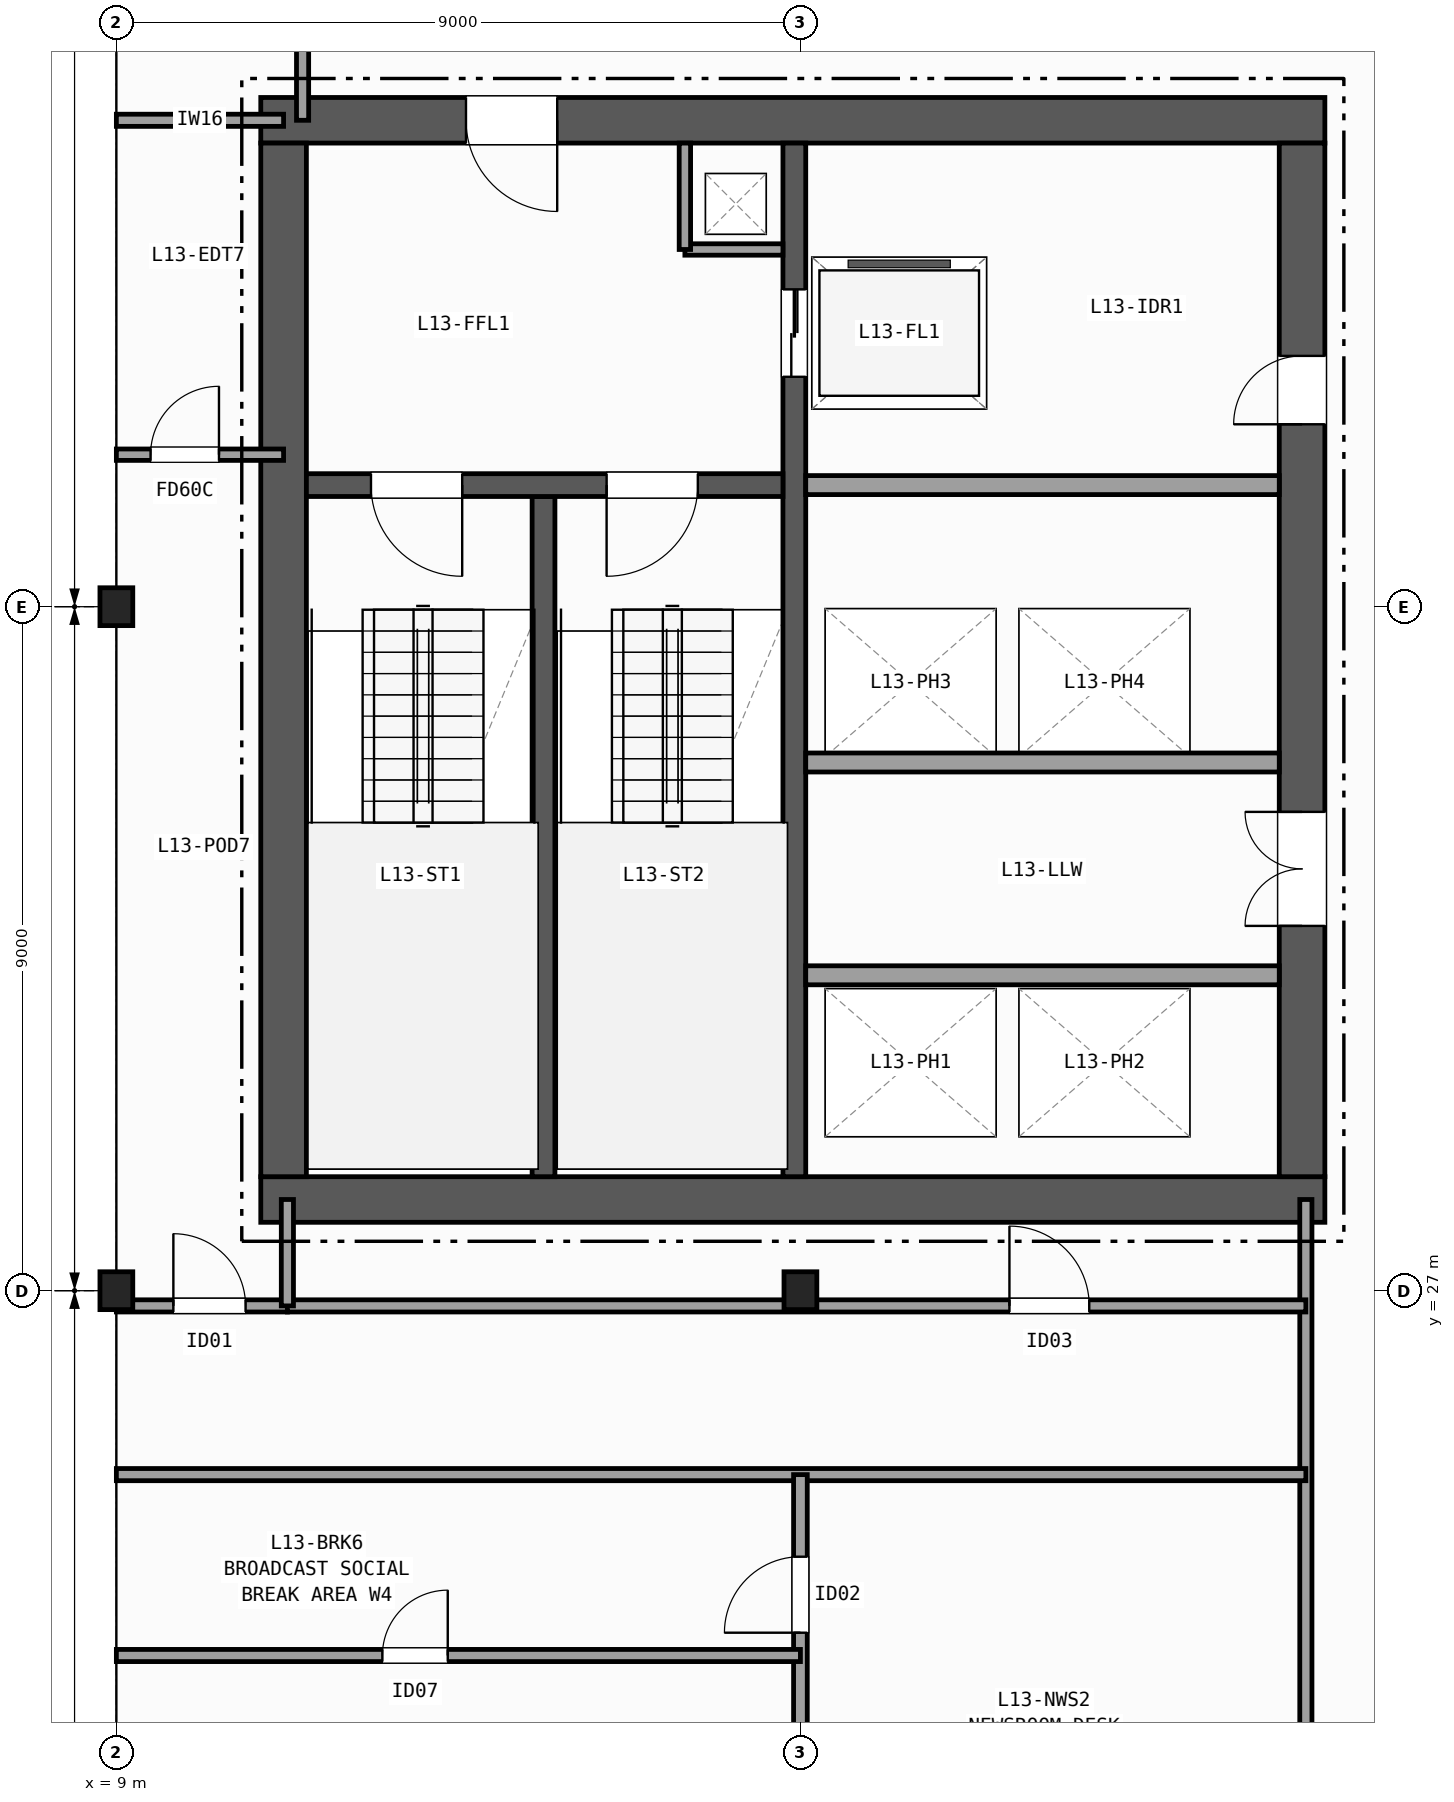
"""IFC4 building model, lengths in metres.
Left out: names, types, materials, properties, quantities, classifications, styles, units other than length and angle.
Written with IfcOpenShell. Run it as: python <this file> out.ifc"""

import sys

from ifc_helpers import new_model, si_unit, direction, frame, frame_2d, origin, origin_2d, place, context, subcontext, project, spatial, rectangle, i_section, extrude, element, fill, save


model = new_model("IFC4")
c1 = context("Model", 3, precision=1e-05, world=origin(), true_north=direction((0.0, 1.0)))
c2 = subcontext(c1, "Body", "Model", "MODEL_VIEW")
j1 = project(units=[si_unit("LENGTHUNIT", "METRE"), si_unit("PLANEANGLEUNIT", "RADIAN")], contexts=[c1])
p1 = place(None, origin())
s1 = spatial("IfcSite", under=j1, at=p1, CompositionType="ELEMENT")
p2 = place(p1, origin())
s2 = spatial("IfcBuilding", under=s1, at=p2, CompositionType="ELEMENT")
p3 = place(p2, frame((0.0, 0.0, 58.2)))
s3 = spatial("IfcBuildingStorey", under=s2, at=p3, CompositionType="ELEMENT", Elevation=58.2)
for number, where, z_axis, x_axis in (
    (1, (9.0, 27.0, 0.0), (0.0, 0.0, 1.0), (1.0, 0.0, 0.0)),
    (2, (9.0, 36.0, 0.0), (0.0, 0.0, 1.0), (1.0, 0.0, 0.0)),
    (3, (18.0, 27.0, 0.0), (0.0, 0.0, 1.0), (1.0, 0.0, 0.0)),
):
    element("IfcColumn", number, at=place(p3, frame(where, z_axis=z_axis, x_axis=x_axis)), inside=s3, PredefinedType="COLUMN", context=c2, shape_type="SweptSolid", body=[
        extrude(i_section(OverallWidth=0.432, OverallDepth=0.498, WebThickness=0.056, FlangeThickness=0.089, FilletRadius=0.015, at=origin_2d()), origin(), (0.0, 0.0, 1.0), 3.7),
    ])
p4 = place(p3, frame((10.9, 28.2, 0.0), z_axis=(0.0, 0.0, 1.0), x_axis=(1.0, 0.0, 0.0)))
e4 = element("IfcWall", 4, at=p4, inside=s3, PredefinedType="SHEAR", context=c2, shape_type="SweptSolid", body=[
    extrude(rectangle(XDim=14.0, YDim=0.6, at=frame_2d((7.0, 0.0))), origin(), (0.0, 0.0, 1.0), 3.42),
])
p5 = place(p3, frame((24.9, 42.4, 0.0), z_axis=(0.0, 0.0, 1.0), x_axis=(-1.0, 0.0, 0.0)))
e5 = element("IfcWall", 5, at=p5, inside=s3, PredefinedType="SHEAR", context=c2, shape_type="SweptSolid", body=[
    extrude(rectangle(XDim=14.0, YDim=0.6, at=frame_2d((7.0, 0.0))), origin(), (0.0, 0.0, 1.0), 3.42),
])
p6 = place(p5, frame((10.1, 0.0, 0.0)))
e6 = element("IfcOpeningElement", 6, at=p6, cuts=e5, PredefinedType="OPENING", context=c2, shape_type="SweptSolid", body=[
    extrude(rectangle(XDim=1.2, YDim=2.15, at=frame_2d((0.6, 1.075))), frame((0.0, 0.31, 0.0), z_axis=(0.0, -1.0, 0.0), x_axis=(1.0, 0.0, 0.0)), (0.0, 0.0, 1.0), 0.62),
])
p7 = place(p3, frame((11.2, 42.1, 0.0), z_axis=(0.0, 0.0, 1.0), x_axis=(0.0, -1.0, 0.0)))
e7 = element("IfcWall", 7, at=p7, inside=s3, PredefinedType="SHEAR", context=c2, shape_type="SweptSolid", body=[
    extrude(rectangle(XDim=13.6, YDim=0.6, at=frame_2d((6.8, 0.0))), origin(), (0.0, 0.0, 1.0), 3.42),
])
p8 = place(p3, frame((24.6, 28.5, 0.0), z_axis=(0.0, 0.0, 1.0), x_axis=(0.0, 1.0, 0.0)))
e8 = element("IfcWall", 8, at=p8, inside=s3, PredefinedType="SHEAR", context=c2, shape_type="SweptSolid", body=[
    extrude(rectangle(XDim=13.6, YDim=0.6, at=frame_2d((6.8, 0.0))), origin(), (0.0, 0.0, 1.0), 3.42),
])
p9 = place(p8, frame((3.3, 0.0, 0.0)))
e9 = element("IfcOpeningElement", 9, at=p9, cuts=e8, PredefinedType="OPENING", context=c2, shape_type="SweptSolid", body=[
    extrude(rectangle(XDim=1.5, YDim=2.2, at=frame_2d((0.75, 1.1))), frame((0.0, 0.31, 0.0), z_axis=(0.0, -1.0, 0.0), x_axis=(1.0, 0.0, 0.0)), (0.0, 0.0, 1.0), 0.62),
])
p10 = place(p8, frame((9.9, 0.0, 0.0)))
e10 = element("IfcOpeningElement", 10, at=p10, cuts=e8, PredefinedType="OPENING", context=c2, shape_type="SweptSolid", body=[
    extrude(rectangle(XDim=0.9, YDim=2.1, at=frame_2d((0.45, 1.05))), frame((0.0, 0.31, 0.0), z_axis=(0.0, -1.0, 0.0), x_axis=(1.0, 0.0, 0.0)), (0.0, 0.0, 1.0), 0.62),
])
p11 = place(p3, frame((14.62, 28.5, 0.0), z_axis=(0.0, 0.0, 1.0), x_axis=(0.0, 1.0, 0.0)))
e11 = element("IfcWall", 11, at=p11, inside=s3, PredefinedType="SHEAR", context=c2, shape_type="SweptSolid", body=[
    extrude(rectangle(XDim=8.95, YDim=0.3, at=frame_2d((4.475, 0.0))), origin(), (0.0, 0.0, 1.0), 3.42),
])
p12 = place(p3, frame((17.92, 42.1, 0.0), z_axis=(0.0, 0.0, 1.0), x_axis=(0.0, -1.0, 0.0)))
e12 = element("IfcWall", 12, at=p12, inside=s3, PredefinedType="SHEAR", context=c2, shape_type="SweptSolid", body=[
    extrude(rectangle(XDim=13.6, YDim=0.3, at=frame_2d((6.8, 0.0))), origin(), (0.0, 0.0, 1.0), 3.42),
])
p13 = place(p12, frame((1.925, 0.0, 0.0)))
e13 = element("IfcOpeningElement", 13, at=p13, cuts=e12, PredefinedType="OPENING", context=c2, shape_type="SweptSolid", body=[
    extrude(rectangle(XDim=1.15, YDim=2.15, at=frame_2d((0.575, 1.075))), frame((0.0, 0.16, 0.0), z_axis=(0.0, -1.0, 0.0), x_axis=(1.0, 0.0, 0.0)), (0.0, 0.0, 1.0), 0.32),
])
p14 = place(p3, frame((17.77, 37.6, 0.0), z_axis=(0.0, 0.0, 1.0), x_axis=(-1.0, 0.0, 0.0)))
e14 = element("IfcWall", 14, at=p14, inside=s3, PredefinedType="SHEAR", context=c2, shape_type="SweptSolid", body=[
    extrude(rectangle(XDim=6.27, YDim=0.3, at=frame_2d((3.135, 0.0))), origin(), (0.0, 0.0, 1.0), 3.42),
])
p15 = place(p14, frame((4.22, 0.0, 0.0)))
e15 = element("IfcOpeningElement", 15, at=p15, cuts=e14, PredefinedType="OPENING", context=c2, shape_type="SweptSolid", body=[
    extrude(rectangle(XDim=1.2, YDim=2.15, at=frame_2d((0.6, 1.075))), frame((0.0, 0.16, 0.0), z_axis=(0.0, -1.0, 0.0), x_axis=(1.0, 0.0, 0.0)), (0.0, 0.0, 1.0), 0.32),
])
p16 = place(p14, frame((1.12, 0.0, 0.0)))
e16 = element("IfcOpeningElement", 16, at=p16, cuts=e14, PredefinedType="OPENING", context=c2, shape_type="SweptSolid", body=[
    extrude(rectangle(XDim=1.2, YDim=2.15, at=frame_2d((0.6, 1.075))), frame((0.0, 0.16, 0.0), z_axis=(0.0, -1.0, 0.0), x_axis=(1.0, 0.0, 0.0)), (0.0, 0.0, 1.0), 0.32),
])
p17 = place(p3, frame((16.48, 40.7, 0.0), z_axis=(0.0, 0.0, 1.0), x_axis=(1.0, 0.0, 0.0)))
e17 = element("IfcWall", 17, at=p17, inside=s3, PredefinedType="PARTITIONING", context=c2, shape_type="SweptSolid", body=[
    extrude(rectangle(XDim=1.29, YDim=0.15, at=frame_2d((0.645, 0.0))), origin(), (0.0, 0.0, 1.0), 3.42),
])
p18 = place(p3, frame((16.48, 40.7, 0.0), z_axis=(0.0, 0.0, 1.0), x_axis=(0.0, 1.0, 0.0)))
e18 = element("IfcWall", 18, at=p18, inside=s3, PredefinedType="PARTITIONING", context=c2, shape_type="SweptSolid", body=[
    extrude(rectangle(XDim=1.4, YDim=0.15, at=frame_2d((0.7, 0.0))), origin(), (0.0, 0.0, 1.0), 3.42),
])
for number, where, z_axis, x_axis in (
    (19, (18.07, 37.6, 0.0), (0.0, 0.0, 1.0), (1.0, 0.0, 0.0)),
    (20, (18.07, 31.15, 0.0), (0.0, 0.0, 1.0), (1.0, 0.0, 0.0)),
    (21, (24.3, 33.95, 0.0), (0.0, 0.0, 1.0), (-1.0, 0.0, 0.0)),
):
    element("IfcWall", number, at=place(p3, frame(where, z_axis=z_axis, x_axis=x_axis)), inside=s3, PredefinedType="PARTITIONING", context=c2, shape_type="SweptSolid", body=[
        extrude(rectangle(XDim=6.23, YDim=0.25, at=frame_2d((3.115, 0.0))), origin(), (0.0, 0.0, 1.0), 3.42),
    ])
p19 = place(p3, frame((9.0, 26.8, 0.0), z_axis=(0.0, 0.0, 1.0), x_axis=(1.0, 0.0, 0.0)))
e22 = element("IfcWall", 22, at=p19, inside=s3, PredefinedType="PARTITIONING", context=c2, shape_type="SweptSolid", body=[
    extrude(rectangle(XDim=2.25, YDim=0.16, at=frame_2d((1.125, 0.0))), origin(), (0.0, 0.0, 1.0), 2.627),
])
p20 = place(p19, frame((0.75, 0.0, 0.0)))
e23 = element("IfcOpeningElement", 23, at=p20, cuts=e22, PredefinedType="OPENING", context=c2, shape_type="SweptSolid", body=[
    extrude(rectangle(XDim=0.95, YDim=2.1, at=frame_2d((0.475, 1.05))), frame((0.0, 0.09, 0.0), z_axis=(0.0, -1.0, 0.0), x_axis=(1.0, 0.0, 0.0)), (0.0, 0.0, 1.0), 0.18),
])
p21 = place(p3, frame((9.0, 42.4, 0.0), z_axis=(0.0, 0.0, 1.0), x_axis=(1.0, 0.0, 0.0)))
e24 = element("IfcWall", 24, at=p21, inside=s3, PredefinedType="PARTITIONING", context=c2, shape_type="SweptSolid", body=[
    extrude(rectangle(XDim=2.2, YDim=0.16, at=frame_2d((1.1, 0.0))), origin(), (0.0, 0.0, 1.0), 2.627),
])
p22 = place(p3, frame((11.45, 42.4, 0.0), z_axis=(0.0, 0.0, 1.0), x_axis=(0.0, 1.0, 0.0)))
e25 = element("IfcWall", 25, at=p22, inside=s3, PredefinedType="PARTITIONING", context=c2, shape_type="SweptSolid", body=[
    extrude(rectangle(XDim=2.1, YDim=0.16, at=frame_2d((1.05, 0.0))), origin(), (0.0, 0.0, 1.0), 3.42),
])
p23 = place(p3, frame((9.0, 38.0, 0.0), z_axis=(0.0, 0.0, 1.0), x_axis=(1.0, 0.0, 0.0)))
e26 = element("IfcWall", 26, at=p23, inside=s3, PredefinedType="PARTITIONING", context=c2, shape_type="SweptSolid", body=[
    extrude(rectangle(XDim=2.2, YDim=0.15, at=frame_2d((1.1, 0.0))), origin(), (0.0, 0.0, 1.0), 2.627),
])
p24 = place(p23, frame((0.45, 0.0, 0.0)))
e27 = element("IfcOpeningElement", 27, at=p24, cuts=e26, PredefinedType="OPENING", context=c2, shape_type="SweptSolid", body=[
    extrude(rectangle(XDim=0.9, YDim=2.1, at=frame_2d((0.45, 1.05))), frame((0.0, 0.085, 0.0), z_axis=(0.0, -1.0, 0.0), x_axis=(1.0, 0.0, 0.0)), (0.0, 0.0, 1.0), 0.17),
])
p25 = place(p3, frame((24.65, 9.0, 0.0), z_axis=(0.0, 0.0, 1.0), x_axis=(0.0, 1.0, 0.0)))
e28 = element("IfcWall", 28, at=p25, inside=s3, PredefinedType="PARTITIONING", context=c2, shape_type="SweptSolid", body=[
    extrude(rectangle(XDim=19.2, YDim=0.16, at=frame_2d((9.6, 0.0))), origin(), (0.0, 0.0, 1.0), 2.627),
])
p26 = place(p25, frame((2.8, 0.0, 0.0)))
e29 = element("IfcOpeningElement", 29, at=p26, cuts=e28, PredefinedType="OPENING", context=c2, shape_type="SweptSolid", body=[
    extrude(rectangle(XDim=1.2, YDim=2.15, at=frame_2d((0.6, 1.075))), frame((0.0, 0.09, 0.0), z_axis=(0.0, -1.0, 0.0), x_axis=(1.0, 0.0, 0.0)), (0.0, 0.0, 1.0), 0.18),
])
p27 = place(p25, frame((10.59, 0.0, 0.0)))
e30 = element("IfcOpeningElement", 30, at=p27, cuts=e28, PredefinedType="OPENING", context=c2, shape_type="SweptSolid", body=[
    extrude(rectangle(XDim=0.86, YDim=2.05, at=frame_2d((0.43, 1.025))), frame((0.0, 0.09, 0.0), z_axis=(0.0, -1.0, 0.0), x_axis=(1.0, 0.0, 0.0)), (0.0, 0.0, 1.0), 0.18),
])
p28 = place(p3, frame((9.0, 24.58, 0.0), z_axis=(0.0, 0.0, 1.0), x_axis=(1.0, 0.0, 0.0)))
e31 = element("IfcWall", 31, at=p28, inside=s3, PredefinedType="PARTITIONING", context=c2, shape_type="SweptSolid", body=[
    extrude(rectangle(XDim=15.65, YDim=0.16, at=frame_2d((7.825, 0.0))), origin(), (0.0, 0.0, 1.0), 2.627),
])
p29 = place(p3, frame((11.25, 26.8, 0.0), z_axis=(0.0, 0.0, 1.0), x_axis=(1.0, 0.0, 0.0)))
e32 = element("IfcWall", 32, at=p29, inside=s3, PredefinedType="PARTITIONING", context=c2, shape_type="SweptSolid", body=[
    extrude(rectangle(XDim=13.4, YDim=0.16, at=frame_2d((6.7, 0.0))), origin(), (0.0, 0.0, 1.0), 2.789),
])
p30 = place(p29, frame((9.5, 0.0, 0.0)))
e33 = element("IfcOpeningElement", 33, at=p30, cuts=e32, PredefinedType="OPENING", context=c2, shape_type="SweptSolid", body=[
    extrude(rectangle(XDim=1.05, YDim=2.15, at=frame_2d((0.525, 1.075))), frame((0.0, 0.09, 0.0), z_axis=(0.0, -1.0, 0.0), x_axis=(1.0, 0.0, 0.0)), (0.0, 0.0, 1.0), 0.18),
])
p31 = place(p3, frame((11.25, 26.8, 0.0), z_axis=(0.0, 0.0, 1.0), x_axis=(0.0, 1.0, 0.0)))
e34 = element("IfcWall", 34, at=p31, inside=s3, PredefinedType="PARTITIONING", context=c2, shape_type="SweptSolid", body=[
    extrude(rectangle(XDim=1.4, YDim=0.16, at=frame_2d((0.7, 0.0))), origin(), (0.0, 0.0, 1.0), 2.789),
])
p32 = place(p3, frame((18.0, 9.0, 0.0), z_axis=(0.0, 0.0, 1.0), x_axis=(0.0, 1.0, 0.0)))
e35 = element("IfcWall", 35, at=p32, inside=s3, PredefinedType="PARTITIONING", context=c2, shape_type="SweptSolid", body=[
    extrude(rectangle(XDim=15.58, YDim=0.18, at=frame_2d((7.79, 0.0))), origin(), (0.0, 0.0, 1.0), 2.627),
])
p33 = place(p32, frame((2.2, 0.0, 0.0)))
e36 = element("IfcOpeningElement", 36, at=p33, cuts=e35, PredefinedType="OPENING", context=c2, shape_type="SweptSolid", body=[
    extrude(rectangle(XDim=0.95, YDim=2.1, at=frame_2d((0.475, 1.05))), frame((0.0, 0.1, 0.0), z_axis=(0.0, -1.0, 0.0), x_axis=(1.0, 0.0, 0.0)), (0.0, 0.0, 1.0), 0.2),
])
p34 = place(p32, frame((13.5, 0.0, 0.0)))
e37 = element("IfcOpeningElement", 37, at=p34, cuts=e35, PredefinedType="OPENING", context=c2, shape_type="SweptSolid", body=[
    extrude(rectangle(XDim=1.0, YDim=2.1, at=frame_2d((0.5, 1.05))), frame((0.0, 0.1, 0.0), z_axis=(0.0, -1.0, 0.0), x_axis=(1.0, 0.0, 0.0)), (0.0, 0.0, 1.0), 0.2),
])
p35 = place(p3, frame((9.0, 22.2, 0.0), z_axis=(0.0, 0.0, 1.0), x_axis=(1.0, 0.0, 0.0)))
e38 = element("IfcWall", 38, at=p35, inside=s3, PredefinedType="PARTITIONING", context=c2, shape_type="SweptSolid", body=[
    extrude(rectangle(XDim=9.0, YDim=0.16, at=frame_2d((4.5, 0.0))), origin(), (0.0, 0.0, 1.0), 2.627),
])
p36 = place(p35, frame((3.5, 0.0, 0.0)))
e39 = element("IfcOpeningElement", 39, at=p36, cuts=e38, PredefinedType="OPENING", context=c2, shape_type="SweptSolid", body=[
    extrude(rectangle(XDim=0.86, YDim=2.05, at=frame_2d((0.43, 1.025))), frame((0.0, 0.09, 0.0), z_axis=(0.0, -1.0, 0.0), x_axis=(1.0, 0.0, 0.0)), (0.0, 0.0, 1.0), 0.18),
])
p37 = place(p15, origin())
e40 = element("IfcDoor", 40, at=p37, inside=s3, OperationType="SINGLE_SWING_LEFT", PredefinedType="DOOR", context=c2, shape_type="SweptSolid", body=[
    extrude(rectangle(XDim=1.2, YDim=2.15, at=frame_2d((0.6, 1.075))), frame((0.0, 0.025, 0.0), z_axis=(0.0, -1.0, 0.0), x_axis=(1.0, 0.0, 0.0)), (0.0, 0.0, 1.0), 0.05),
])
fill(e15, e40)
p38 = place(p16, origin())
e41 = element("IfcDoor", 41, at=p38, inside=s3, OperationType="SINGLE_SWING_RIGHT", PredefinedType="DOOR", context=c2, shape_type="SweptSolid", body=[
    extrude(rectangle(XDim=1.2, YDim=2.15, at=frame_2d((0.6, 1.075))), frame((0.0, 0.025, 0.0), z_axis=(0.0, -1.0, 0.0), x_axis=(1.0, 0.0, 0.0)), (0.0, 0.0, 1.0), 0.05),
])
fill(e16, e41)
p39 = place(p9, origin())
e42 = element("IfcDoor", 42, at=p39, inside=s3, OperationType="DOUBLE_DOOR_SINGLE_SWING", PredefinedType="DOOR", context=c2, shape_type="SweptSolid", body=[
    extrude(rectangle(XDim=1.5, YDim=2.2, at=frame_2d((0.75, 1.1))), frame((0.0, 0.025, 0.0), z_axis=(0.0, -1.0, 0.0), x_axis=(1.0, 0.0, 0.0)), (0.0, 0.0, 1.0), 0.05),
])
fill(e9, e42)
p40 = place(p6, origin())
e43 = element("IfcDoor", 43, at=p40, inside=s3, OperationType="SINGLE_SWING_LEFT", PredefinedType="DOOR", context=c2, shape_type="SweptSolid", body=[
    extrude(rectangle(XDim=1.2, YDim=2.15, at=frame_2d((0.6, 1.075))), frame((0.0, 0.025, 0.0), z_axis=(0.0, -1.0, 0.0), x_axis=(1.0, 0.0, 0.0)), (0.0, 0.0, 1.0), 0.05),
])
fill(e6, e43)
p41 = place(p10, origin())
e44 = element("IfcDoor", 44, at=p41, inside=s3, OperationType="SINGLE_SWING_LEFT", PredefinedType="DOOR", context=c2, shape_type="SweptSolid", body=[
    extrude(rectangle(XDim=0.9, YDim=2.1, at=frame_2d((0.45, 1.05))), frame((0.0, 0.025, 0.0), z_axis=(0.0, -1.0, 0.0), x_axis=(1.0, 0.0, 0.0)), (0.0, 0.0, 1.0), 0.05),
])
fill(e10, e44)
p42 = place(p13, origin())
e45 = element("IfcDoor", 45, at=p42, inside=s3, OperationType="DOUBLE_DOOR_SLIDING", PredefinedType="DOOR", context=c2, shape_type="SweptSolid", body=[
    extrude(rectangle(XDim=1.15, YDim=2.15, at=frame_2d((0.575, 1.075))), frame((0.0, 0.025, 0.0), z_axis=(0.0, -1.0, 0.0), x_axis=(1.0, 0.0, 0.0)), (0.0, 0.0, 1.0), 0.05),
])
fill(e13, e45)
p43 = place(p20, origin())
e46 = element("IfcDoor", 46, at=p43, inside=s3, OperationType="SINGLE_SWING_LEFT", PredefinedType="DOOR", context=c2, shape_type="SweptSolid", body=[
    extrude(rectangle(XDim=0.95, YDim=2.1, at=frame_2d((0.475, 1.05))), frame((0.0, 0.025, 0.0), z_axis=(0.0, -1.0, 0.0), x_axis=(1.0, 0.0, 0.0)), (0.0, 0.0, 1.0), 0.05),
])
fill(e23, e46)
p44 = place(p24, origin())
e47 = element("IfcDoor", 47, at=p44, inside=s3, OperationType="SINGLE_SWING_RIGHT", PredefinedType="DOOR", context=c2, shape_type="SweptSolid", body=[
    extrude(rectangle(XDim=0.9, YDim=2.1, at=frame_2d((0.45, 1.05))), frame((0.0, 0.025, 0.0), z_axis=(0.0, -1.0, 0.0), x_axis=(1.0, 0.0, 0.0)), (0.0, 0.0, 1.0), 0.05),
])
fill(e27, e47)
p45 = place(p30, origin())
e48 = element("IfcDoor", 48, at=p45, inside=s3, OperationType="SINGLE_SWING_LEFT", PredefinedType="DOOR", context=c2, shape_type="SweptSolid", body=[
    extrude(rectangle(XDim=1.05, YDim=2.15, at=frame_2d((0.525, 1.075))), frame((0.0, 0.025, 0.0), z_axis=(0.0, -1.0, 0.0), x_axis=(1.0, 0.0, 0.0)), (0.0, 0.0, 1.0), 0.05),
])
fill(e33, e48)
p46 = place(p34, origin())
e49 = element("IfcDoor", 49, at=p46, inside=s3, OperationType="SINGLE_SWING_LEFT", PredefinedType="DOOR", context=c2, shape_type="SweptSolid", body=[
    extrude(rectangle(XDim=1.0, YDim=2.1, at=frame_2d((0.5, 1.05))), frame((0.0, 0.025, 0.0), z_axis=(0.0, -1.0, 0.0), x_axis=(1.0, 0.0, 0.0)), (0.0, 0.0, 1.0), 0.05),
])
fill(e37, e49)
p47 = place(p36, origin())
e50 = element("IfcDoor", 50, at=p47, inside=s3, OperationType="SINGLE_SWING_RIGHT", PredefinedType="DOOR", context=c2, shape_type="SweptSolid", body=[
    extrude(rectangle(XDim=0.86, YDim=2.05, at=frame_2d((0.43, 1.025))), frame((0.0, 0.025, 0.0), z_axis=(0.0, -1.0, 0.0), x_axis=(1.0, 0.0, 0.0)), (0.0, 0.0, 1.0), 0.05),
])
fill(e39, e50)
save(model, sys.argv[1])
